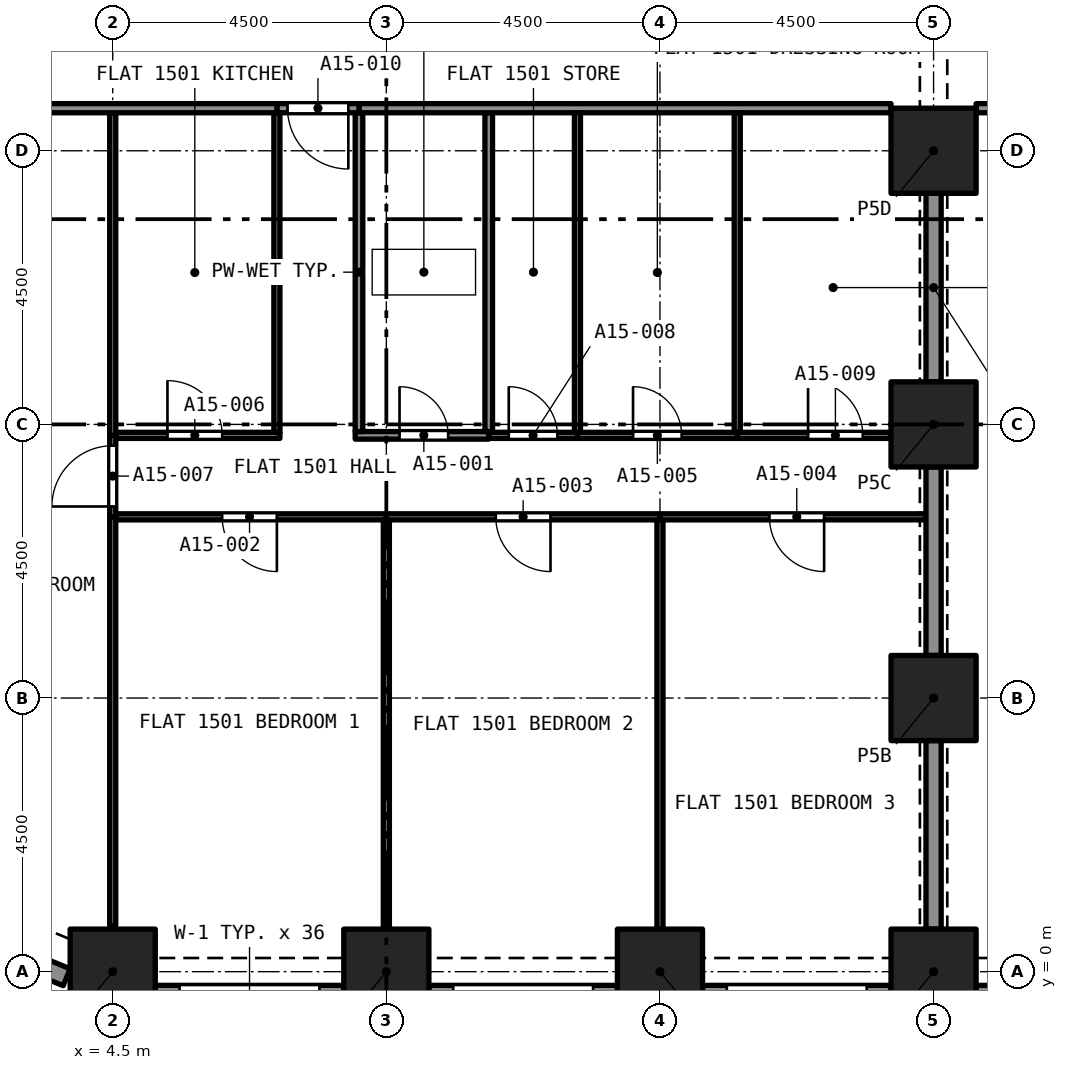
"""IFC4 building model, lengths in metres.
Left out: names, types, materials, properties, quantities, classifications, styles, units other than length and angle.
Written with IfcOpenShell. Run it as: python <this file> out.ifc"""

import sys

from ifc_helpers import new_model, si_unit, direction, frame, frame_2d, origin, origin_2d, place, context, subcontext, project, spatial, rectangle, extrude, element, fill, save


model = new_model("IFC4")
c1 = context("Model", 3, precision=1e-05, world=origin(), true_north=direction((0.0, 1.0)))
c2 = subcontext(c1, "Body", "Model", "MODEL_VIEW")
j1 = project(units=[si_unit("LENGTHUNIT", "METRE"), si_unit("PLANEANGLEUNIT", "RADIAN")], contexts=[c1])
p1 = place(None, origin())
s1 = spatial("IfcSite", under=j1, at=p1, CompositionType="ELEMENT")
p2 = place(p1, origin())
s2 = spatial("IfcBuilding", under=s1, at=p2, CompositionType="ELEMENT")
p3 = place(p2, frame((0.0, 0.0, 59.2)))
s3 = spatial("IfcBuildingStorey", under=s2, at=p3, CompositionType="ELEMENT", Elevation=59.2)
for number, where, z_axis, x_axis in (
    (1, (4.5, 0.0, 0.0), (0.0, 0.0, 1.0), (1.0, 0.0, 0.0)),
    (2, (9.0, 0.0, 0.0), (0.0, 0.0, 1.0), (1.0, 0.0, 0.0)),
    (3, (13.5, 0.0, 0.0), (0.0, 0.0, 1.0), (1.0, 0.0, 0.0)),
    (4, (18.0, 0.0, 0.0), (0.0, 0.0, 1.0), (1.0, 0.0, 0.0)),
    (5, (18.0, 4.5, 0.0), (0.0, 0.0, 1.0), (1.0, 0.0, 0.0)),
    (6, (18.0, 9.0, 0.0), (0.0, 0.0, 1.0), (1.0, 0.0, 0.0)),
    (7, (18.0, 13.5, 0.0), (0.0, 0.0, 1.0), (1.0, 0.0, 0.0)),
):
    element("IfcColumn", number, at=place(p3, frame(where, z_axis=z_axis, x_axis=x_axis)), inside=s3, PredefinedType="COLUMN", context=c2, shape_type="SweptSolid", body=[
        extrude(rectangle(XDim=1.4, YDim=1.4, at=origin_2d()), origin(), (0.0, 0.0, 1.0), 3.2),
    ])
p4 = place(p3, frame((3.743, -0.092, 0.0), z_axis=(0.0, 0.0, 1.0), x_axis=(-0.923857286003, 0.382737135771, 0.0)))
e8 = element("IfcWall", 8, at=p4, inside=s3, PredefinedType="SOLIDWALL", context=c2, shape_type="SweptSolid", body=[
    extrude(rectangle(XDim=1.865, YDim=0.3, at=frame_2d((0.933, 0.0))), origin(), (0.0, 0.0, 1.0), 3.2),
])
p5 = place(p4, frame((0.508, 0.0, 0.45)))
e9 = element("IfcOpeningElement", 9, at=p5, cuts=e8, PredefinedType="OPENING", context=c2, shape_type="SweptSolid", body=[
    extrude(rectangle(XDim=1.1, YDim=1.95, at=frame_2d((0.55, 0.975))), frame((0.0, 0.16, 0.0), z_axis=(0.0, -1.0, 0.0), x_axis=(1.0, 0.0, 0.0)), (0.0, 0.0, 1.0), 0.32),
])
p6 = place(p3, frame((8.3, -0.375, 0.0), z_axis=(0.0, 0.0, 1.0), x_axis=(-1.0, 0.0, 0.0)))
e10 = element("IfcWall", 10, at=p6, inside=s3, PredefinedType="SOLIDWALL", context=c2, shape_type="SweptSolid", body=[
    extrude(rectangle(XDim=3.1, YDim=0.3, at=frame_2d((1.55, 0.0))), origin(), (0.0, 0.0, 1.0), 3.2),
])
p7 = place(p6, frame((0.4, 0.0, 0.45)))
e11 = element("IfcOpeningElement", 11, at=p7, cuts=e10, PredefinedType="OPENING", context=c2, shape_type="SweptSolid", body=[
    extrude(rectangle(XDim=2.3, YDim=1.95, at=frame_2d((1.15, 0.975))), frame((0.0, 0.16, 0.0), z_axis=(0.0, -1.0, 0.0), x_axis=(1.0, 0.0, 0.0)), (0.0, 0.0, 1.0), 0.32),
])
p8 = place(p3, frame((12.8, -0.375, 0.0), z_axis=(0.0, 0.0, 1.0), x_axis=(-1.0, 0.0, 0.0)))
e12 = element("IfcWall", 12, at=p8, inside=s3, PredefinedType="SOLIDWALL", context=c2, shape_type="SweptSolid", body=[
    extrude(rectangle(XDim=3.1, YDim=0.3, at=frame_2d((1.55, 0.0))), origin(), (0.0, 0.0, 1.0), 3.2),
])
p9 = place(p8, frame((0.4, 0.0, 0.45)))
e13 = element("IfcOpeningElement", 13, at=p9, cuts=e12, PredefinedType="OPENING", context=c2, shape_type="SweptSolid", body=[
    extrude(rectangle(XDim=2.3, YDim=1.95, at=frame_2d((1.15, 0.975))), frame((0.0, 0.16, 0.0), z_axis=(0.0, -1.0, 0.0), x_axis=(1.0, 0.0, 0.0)), (0.0, 0.0, 1.0), 0.32),
])
p10 = place(p3, frame((17.3, -0.375, 0.0), z_axis=(0.0, 0.0, 1.0), x_axis=(-1.0, 0.0, 0.0)))
e14 = element("IfcWall", 14, at=p10, inside=s3, PredefinedType="SOLIDWALL", context=c2, shape_type="SweptSolid", body=[
    extrude(rectangle(XDim=3.1, YDim=0.3, at=frame_2d((1.55, 0.0))), origin(), (0.0, 0.0, 1.0), 3.2),
])
p11 = place(p10, frame((0.4, 0.0, 0.45)))
e15 = element("IfcOpeningElement", 15, at=p11, cuts=e14, PredefinedType="OPENING", context=c2, shape_type="SweptSolid", body=[
    extrude(rectangle(XDim=2.3, YDim=1.95, at=frame_2d((1.15, 0.975))), frame((0.0, 0.16, 0.0), z_axis=(0.0, -1.0, 0.0), x_axis=(1.0, 0.0, 0.0)), (0.0, 0.0, 1.0), 0.32),
])
p12 = place(p3, frame((21.8, -0.375, 0.0), z_axis=(0.0, 0.0, 1.0), x_axis=(-1.0, 0.0, 0.0)))
e16 = element("IfcWall", 16, at=p12, inside=s3, PredefinedType="SOLIDWALL", context=c2, shape_type="SweptSolid", body=[
    extrude(rectangle(XDim=3.1, YDim=0.3, at=frame_2d((1.55, 0.0))), origin(), (0.0, 0.0, 1.0), 3.2),
])
p13 = place(p12, frame((0.4, 0.0, 0.45)))
e17 = element("IfcOpeningElement", 17, at=p13, cuts=e16, PredefinedType="OPENING", context=c2, shape_type="SweptSolid", body=[
    extrude(rectangle(XDim=2.3, YDim=1.95, at=frame_2d((1.15, 0.975))), frame((0.0, 0.16, 0.0), z_axis=(0.0, -1.0, 0.0), x_axis=(1.0, 0.0, 0.0)), (0.0, 0.0, 1.0), 0.32),
])
p14 = place(p3, frame((8.488, 8.82, 0.0), z_axis=(0.0, 0.0, 1.0), x_axis=(1.0, 0.0, 0.0)))
e18 = element("IfcWall", 18, at=p14, inside=s3, PredefinedType="PARTITIONING", context=c2, shape_type="SweptSolid", body=[
    extrude(rectangle(XDim=2.196, YDim=0.125, at=frame_2d((1.098, 0.0))), origin(), (0.0, 0.0, 1.0), 2.9),
])
p15 = place(p14, frame((0.729, 0.0, 0.0)))
e19 = element("IfcOpeningElement", 19, at=p15, cuts=e18, PredefinedType="OPENING", context=c2, shape_type="SweptSolid", body=[
    extrude(rectangle(XDim=0.8, YDim=2.1, at=frame_2d((0.4, 1.05))), frame((0.0, 0.073, 0.0), z_axis=(0.0, -1.0, 0.0), x_axis=(1.0, 0.0, 0.0)), (0.0, 0.0, 1.0), 0.145),
])
for number, where, z_axis, x_axis in (
    (20, (8.55, 8.883, 0.0), (0.0, 0.0, 1.0), (0.0, 1.0, 0.0)),
    (21, (10.684, 8.883, 0.0), (0.0, 0.0, 1.0), (0.0, 1.0, 0.0)),
):
    element("IfcWall", number, at=place(p3, frame(where, z_axis=z_axis, x_axis=x_axis)), inside=s3, PredefinedType="PARTITIONING", context=c2, shape_type="SweptSolid", body=[
        extrude(rectangle(XDim=5.242, YDim=0.125, at=frame_2d((2.621, 0.0))), origin(), (0.0, 0.0, 1.0), 2.9),
    ])
p16 = place(p3, frame((8.55, 14.2, 0.0), z_axis=(0.0, 0.0, 1.0), x_axis=(1.0, 0.0, 0.0)))
e22 = element("IfcWall", 22, at=p16, inside=s3, PredefinedType="PARTITIONING", context=c2, shape_type="SweptSolid", body=[
    extrude(rectangle(XDim=8.75, YDim=0.15, at=frame_2d((4.375, 0.0))), origin(), (0.0, 0.0, 1.0), 2.9),
])
p17 = place(p3, frame((9.0, 0.7, 0.0), z_axis=(0.0, 0.0, 1.0), x_axis=(0.0, 1.0, 0.0)))
e23 = element("IfcWall", 23, at=p17, inside=s3, PredefinedType="PARTITIONING", context=c2, shape_type="SweptSolid", body=[
    extrude(rectangle(XDim=6.73, YDim=0.1, at=frame_2d((3.365, 0.0))), origin(), (0.0, 0.0, 1.0), 2.9),
])
p18 = place(p3, frame((9.0, 7.48, 0.0), z_axis=(0.0, 0.0, 1.0), x_axis=(-1.0, 0.0, 0.0)))
e24 = element("IfcWall", 24, at=p18, inside=s3, PredefinedType="PARTITIONING", context=c2, shape_type="SweptSolid", body=[
    extrude(rectangle(XDim=4.45, YDim=0.1, at=frame_2d((2.225, 0.0))), origin(), (0.0, 0.0, 1.0), 2.9),
])
p19 = place(p18, frame((1.8, 0.0, 0.0)))
e25 = element("IfcOpeningElement", 25, at=p19, cuts=e24, PredefinedType="OPENING", context=c2, shape_type="SweptSolid", body=[
    extrude(rectangle(XDim=0.9, YDim=2.1, at=frame_2d((0.45, 1.05))), frame((0.0, 0.06, 0.0), z_axis=(0.0, -1.0, 0.0), x_axis=(1.0, 0.0, 0.0)), (0.0, 0.0, 1.0), 0.12),
])
p20 = place(p3, frame((4.5, 0.758, 0.0), z_axis=(0.0, 0.0, 1.0), x_axis=(0.0, 1.0, 0.0)))
e26 = element("IfcWall", 26, at=p20, inside=s3, PredefinedType="PARTITIONING", context=c2, shape_type="SweptSolid", body=[
    extrude(rectangle(XDim=6.722, YDim=0.1, at=frame_2d((3.361, 0.0))), origin(), (0.0, 0.0, 1.0), 2.9),
])
p21 = place(p3, frame((13.5, 0.7, 0.0), z_axis=(0.0, 0.0, 1.0), x_axis=(0.0, 1.0, 0.0)))
e27 = element("IfcWall", 27, at=p21, inside=s3, PredefinedType="PARTITIONING", context=c2, shape_type="SweptSolid", body=[
    extrude(rectangle(XDim=6.73, YDim=0.1, at=frame_2d((3.365, 0.0))), origin(), (0.0, 0.0, 1.0), 2.9),
])
p22 = place(p3, frame((13.5, 7.48, 0.0), z_axis=(0.0, 0.0, 1.0), x_axis=(-1.0, 0.0, 0.0)))
e28 = element("IfcWall", 28, at=p22, inside=s3, PredefinedType="PARTITIONING", context=c2, shape_type="SweptSolid", body=[
    extrude(rectangle(XDim=4.5, YDim=0.1, at=frame_2d((2.25, 0.0))), origin(), (0.0, 0.0, 1.0), 2.9),
])
p23 = place(p22, frame((1.8, 0.0, 0.0)))
e29 = element("IfcOpeningElement", 29, at=p23, cuts=e28, PredefinedType="OPENING", context=c2, shape_type="SweptSolid", body=[
    extrude(rectangle(XDim=0.9, YDim=2.1, at=frame_2d((0.45, 1.05))), frame((0.0, 0.06, 0.0), z_axis=(0.0, -1.0, 0.0), x_axis=(1.0, 0.0, 0.0)), (0.0, 0.0, 1.0), 0.12),
])
p24 = place(p3, frame((17.875, 7.48, 0.0), z_axis=(0.0, 0.0, 1.0), x_axis=(-1.0, 0.0, 0.0)))
e30 = element("IfcWall", 30, at=p24, inside=s3, PredefinedType="PARTITIONING", context=c2, shape_type="SweptSolid", body=[
    extrude(rectangle(XDim=4.375, YDim=0.1, at=frame_2d((2.188, 0.0))), origin(), (0.0, 0.0, 1.0), 2.9),
])
p25 = place(p24, frame((1.675, 0.0, 0.0)))
e31 = element("IfcOpeningElement", 31, at=p25, cuts=e30, PredefinedType="OPENING", context=c2, shape_type="SweptSolid", body=[
    extrude(rectangle(XDim=0.9, YDim=2.1, at=frame_2d((0.45, 1.05))), frame((0.0, 0.06, 0.0), z_axis=(0.0, -1.0, 0.0), x_axis=(1.0, 0.0, 0.0)), (0.0, 0.0, 1.0), 0.12),
])
for number, where, z_axis, x_axis in (
    (32, (18.0, 5.2, 0.0), (0.0, 0.0, 1.0), (0.0, 1.0, 0.0)),
    (33, (18.0, 0.7, 0.0), (0.0, 0.0, 1.0), (0.0, 1.0, 0.0)),
):
    element("IfcWall", number, at=place(p3, frame(where, z_axis=z_axis, x_axis=x_axis)), inside=s3, PredefinedType="PARTITIONING", context=c2, shape_type="SweptSolid", body=[
        extrude(rectangle(XDim=3.1, YDim=0.25, at=frame_2d((1.55, 0.0))), origin(), (0.0, 0.0, 1.0), 2.38),
    ])
p26 = place(p3, frame((12.143, 8.82, 0.0), z_axis=(0.0, 0.0, 1.0), x_axis=(1.0, 0.0, 0.0)))
e34 = element("IfcWall", 34, at=p26, inside=s3, PredefinedType="PARTITIONING", context=c2, shape_type="SweptSolid", body=[
    extrude(rectangle(XDim=2.628, YDim=0.1, at=frame_2d((1.314, 0.0))), origin(), (0.0, 0.0, 1.0), 2.9),
])
p27 = place(p26, frame((0.914, 0.0, 0.0)))
e35 = element("IfcOpeningElement", 35, at=p27, cuts=e34, PredefinedType="OPENING", context=c2, shape_type="SweptSolid", body=[
    extrude(rectangle(XDim=0.8, YDim=2.1, at=frame_2d((0.4, 1.05))), frame((0.0, 0.06, 0.0), z_axis=(0.0, -1.0, 0.0), x_axis=(1.0, 0.0, 0.0)), (0.0, 0.0, 1.0), 0.12),
])
for number, where, z_axis, x_axis in (
    (36, (12.143, 8.87, 0.0), (0.0, 0.0, 1.0), (0.0, 1.0, 0.0)),
    (37, (14.771, 8.87, 0.0), (0.0, 0.0, 1.0), (0.0, 1.0, 0.0)),
):
    element("IfcWall", number, at=place(p3, frame(where, z_axis=z_axis, x_axis=x_axis)), inside=s3, PredefinedType="PARTITIONING", context=c2, shape_type="SweptSolid", body=[
        extrude(rectangle(XDim=5.255, YDim=0.1, at=frame_2d((2.627, 0.0))), origin(), (0.0, 0.0, 1.0), 2.9),
    ])
p28 = place(p3, frame((4.55, 8.82, 0.0), z_axis=(0.0, 0.0, 1.0), x_axis=(1.0, 0.0, 0.0)))
e38 = element("IfcWall", 38, at=p28, inside=s3, PredefinedType="PARTITIONING", context=c2, shape_type="SweptSolid", body=[
    extrude(rectangle(XDim=2.7, YDim=0.1, at=frame_2d((1.35, 0.0))), origin(), (0.0, 0.0, 1.0), 2.9),
])
p29 = place(p28, frame((0.85, 0.0, 0.0)))
e39 = element("IfcOpeningElement", 39, at=p29, cuts=e38, PredefinedType="OPENING", context=c2, shape_type="SweptSolid", body=[
    extrude(rectangle(XDim=0.9, YDim=2.1, at=frame_2d((0.45, 1.05))), frame((0.0, 0.06, 0.0), z_axis=(0.0, -1.0, 0.0), x_axis=(1.0, 0.0, 0.0)), (0.0, 0.0, 1.0), 0.12),
])
p30 = place(p3, frame((7.2, 8.87, 0.0), z_axis=(0.0, 0.0, 1.0), x_axis=(0.0, 1.0, 0.0)))
e40 = element("IfcWall", 40, at=p30, inside=s3, PredefinedType="PARTITIONING", context=c2, shape_type="SweptSolid", body=[
    extrude(rectangle(XDim=5.255, YDim=0.1, at=frame_2d((2.627, 0.0))), origin(), (0.0, 0.0, 1.0), 2.9),
])
p31 = place(p3, frame((4.5, 7.48, 0.0), z_axis=(0.0, 0.0, 1.0), x_axis=(0.0, 1.0, 0.0)))
e41 = element("IfcWall", 41, at=p31, inside=s3, PredefinedType="PARTITIONING", context=c2, shape_type="SweptSolid", body=[
    extrude(rectangle(XDim=1.34, YDim=0.1, at=frame_2d((0.67, 0.0))), origin(), (0.0, 0.0, 1.0), 2.9),
])
p32 = place(p31, frame((0.17, 0.0, 0.0)))
e42 = element("IfcOpeningElement", 42, at=p32, cuts=e41, PredefinedType="OPENING", context=c2, shape_type="SweptSolid", body=[
    extrude(rectangle(XDim=1.0, YDim=2.1, at=frame_2d((0.5, 1.05))), frame((0.0, 0.06, 0.0), z_axis=(0.0, -1.0, 0.0), x_axis=(1.0, 0.0, 0.0)), (0.0, 0.0, 1.0), 0.12),
])
p33 = place(p3, frame((10.684, 8.82, 0.0), z_axis=(0.0, 0.0, 1.0), x_axis=(1.0, 0.0, 0.0)))
e43 = element("IfcWall", 43, at=p33, inside=s3, PredefinedType="PARTITIONING", context=c2, shape_type="SweptSolid", body=[
    extrude(rectangle(XDim=1.46, YDim=0.1, at=frame_2d((0.73, 0.0))), origin(), (0.0, 0.0, 1.0), 2.9),
])
p34 = place(p33, frame((0.33, 0.0, 0.0)))
e44 = element("IfcOpeningElement", 44, at=p34, cuts=e43, PredefinedType="OPENING", context=c2, shape_type="SweptSolid", body=[
    extrude(rectangle(XDim=0.8, YDim=2.1, at=frame_2d((0.4, 1.05))), frame((0.0, 0.06, 0.0), z_axis=(0.0, -1.0, 0.0), x_axis=(1.0, 0.0, 0.0)), (0.0, 0.0, 1.0), 0.12),
])
p35 = place(p3, frame((14.771, 8.82, 0.0), z_axis=(0.0, 0.0, 1.0), x_axis=(1.0, 0.0, 0.0)))
e45 = element("IfcWall", 45, at=p35, inside=s3, PredefinedType="PARTITIONING", context=c2, shape_type="SweptSolid", body=[
    extrude(rectangle(XDim=2.529, YDim=0.1, at=frame_2d((1.265, 0.0))), origin(), (0.0, 0.0, 1.0), 2.9),
])
p36 = place(p35, frame((1.165, 0.0, 0.0)))
e46 = element("IfcOpeningElement", 46, at=p36, cuts=e45, PredefinedType="OPENING", context=c2, shape_type="SweptSolid", body=[
    extrude(rectangle(XDim=0.9, YDim=2.1, at=frame_2d((0.45, 1.05))), frame((0.0, 0.06, 0.0), z_axis=(0.0, -1.0, 0.0), x_axis=(1.0, 0.0, 0.0)), (0.0, 0.0, 1.0), 0.12),
])
p37 = place(p3, frame((8.55, 14.2, 0.0), z_axis=(0.0, 0.0, 1.0), x_axis=(-1.0, 0.0, 0.0)))
e47 = element("IfcWall", 47, at=p37, inside=s3, PredefinedType="PARTITIONING", context=c2, shape_type="SweptSolid", body=[
    extrude(rectangle(XDim=1.35, YDim=0.15, at=frame_2d((0.675, 0.0))), origin(), (0.0, 0.0, 1.0), 2.9),
])
p38 = place(p37, frame((0.175, 0.0, 0.0)))
e48 = element("IfcOpeningElement", 48, at=p38, cuts=e47, PredefinedType="OPENING", context=c2, shape_type="SweptSolid", body=[
    extrude(rectangle(XDim=1.0, YDim=2.1, at=frame_2d((0.5, 1.05))), frame((0.0, 0.085, 0.0), z_axis=(0.0, -1.0, 0.0), x_axis=(1.0, 0.0, 0.0)), (0.0, 0.0, 1.0), 0.17),
])
p39 = place(p3, frame((4.5, 8.82, 0.0), z_axis=(0.0, 0.0, 1.0), x_axis=(0.0, 1.0, 0.0)))
e49 = element("IfcWall", 49, at=p39, inside=s3, PredefinedType="PARTITIONING", context=c2, shape_type="SweptSolid", body=[
    extrude(rectangle(XDim=5.305, YDim=0.1, at=frame_2d((2.652, 0.0))), origin(), (0.0, 0.0, 1.0), 2.9),
])
p40 = place(p3, frame((0.7, 14.2, 0.0), z_axis=(0.0, 0.0, 1.0), x_axis=(1.0, 0.0, 0.0)))
e50 = element("IfcWall", 50, at=p40, inside=s3, PredefinedType="PARTITIONING", context=c2, shape_type="SweptSolid", body=[
    extrude(rectangle(XDim=6.5, YDim=0.15, at=frame_2d((3.25, 0.0))), origin(), (0.0, 0.0, 1.0), 2.9),
])
p41 = place(p3, frame((18.0, 9.7, 0.0), z_axis=(0.0, 0.0, 1.0), x_axis=(0.0, 1.0, 0.0)))
e51 = element("IfcWall", 51, at=p41, inside=s3, PredefinedType="PARTITIONING", context=c2, shape_type="SweptSolid", body=[
    extrude(rectangle(XDim=3.1, YDim=0.25, at=frame_2d((1.55, 0.0))), origin(), (0.0, 0.0, 1.0), 2.38),
])
p42 = place(p3, frame((22.5, 14.2, 0.0), z_axis=(0.0, 0.0, 1.0), x_axis=(-1.0, 0.0, 0.0)))
e52 = element("IfcWall", 52, at=p42, inside=s3, PredefinedType="PARTITIONING", context=c2, shape_type="SweptSolid", body=[
    extrude(rectangle(XDim=3.8, YDim=0.15, at=frame_2d((1.9, 0.0))), origin(), (0.0, 0.0, 1.0), 2.75),
])
p43 = place(p42, frame((1.75, 0.0, 0.0)))
e53 = element("IfcOpeningElement", 53, at=p43, cuts=e52, PredefinedType="OPENING", context=c2, shape_type="SweptSolid", body=[
    extrude(rectangle(XDim=1.0, YDim=2.1, at=frame_2d((0.5, 1.05))), frame((0.0, 0.085, 0.0), z_axis=(0.0, -1.0, 0.0), x_axis=(1.0, 0.0, 0.0)), (0.0, 0.0, 1.0), 0.17),
])
p44 = place(p15, origin())
e54 = element("IfcDoor", 54, at=p44, inside=s3, OperationType="SINGLE_SWING_RIGHT", PredefinedType="DOOR", context=c2, shape_type="SweptSolid", body=[
    extrude(rectangle(XDim=0.8, YDim=2.1, at=frame_2d((0.4, 1.05))), frame((0.0, 0.025, 0.0), z_axis=(0.0, -1.0, 0.0), x_axis=(1.0, 0.0, 0.0)), (0.0, 0.0, 1.0), 0.05),
])
fill(e19, e54)
p45 = place(p19, origin())
e55 = element("IfcDoor", 55, at=p45, inside=s3, OperationType="SINGLE_SWING_RIGHT", PredefinedType="DOOR", context=c2, shape_type="SweptSolid", body=[
    extrude(rectangle(XDim=0.9, YDim=2.1, at=frame_2d((0.45, 1.05))), frame((0.0, 0.025, 0.0), z_axis=(0.0, -1.0, 0.0), x_axis=(1.0, 0.0, 0.0)), (0.0, 0.0, 1.0), 0.05),
])
fill(e25, e55)
p46 = place(p23, origin())
e56 = element("IfcDoor", 56, at=p46, inside=s3, OperationType="SINGLE_SWING_LEFT", PredefinedType="DOOR", context=c2, shape_type="SweptSolid", body=[
    extrude(rectangle(XDim=0.9, YDim=2.1, at=frame_2d((0.45, 1.05))), frame((0.0, 0.025, 0.0), z_axis=(0.0, -1.0, 0.0), x_axis=(1.0, 0.0, 0.0)), (0.0, 0.0, 1.0), 0.05),
])
fill(e29, e56)
p47 = place(p25, origin())
e57 = element("IfcDoor", 57, at=p47, inside=s3, OperationType="SINGLE_SWING_LEFT", PredefinedType="DOOR", context=c2, shape_type="SweptSolid", body=[
    extrude(rectangle(XDim=0.9, YDim=2.1, at=frame_2d((0.45, 1.05))), frame((0.0, 0.025, 0.0), z_axis=(0.0, -1.0, 0.0), x_axis=(1.0, 0.0, 0.0)), (0.0, 0.0, 1.0), 0.05),
])
fill(e31, e57)
p48 = place(p27, origin())
e58 = element("IfcDoor", 58, at=p48, inside=s3, OperationType="SINGLE_SWING_LEFT", PredefinedType="DOOR", context=c2, shape_type="SweptSolid", body=[
    extrude(rectangle(XDim=0.8, YDim=2.1, at=frame_2d((0.4, 1.05))), frame((0.0, 0.025, 0.0), z_axis=(0.0, -1.0, 0.0), x_axis=(1.0, 0.0, 0.0)), (0.0, 0.0, 1.0), 0.05),
])
fill(e35, e58)
p49 = place(p29, origin())
e59 = element("IfcDoor", 59, at=p49, inside=s3, OperationType="SINGLE_SWING_LEFT", PredefinedType="DOOR", context=c2, shape_type="SweptSolid", body=[
    extrude(rectangle(XDim=0.9, YDim=2.1, at=frame_2d((0.45, 1.05))), frame((0.0, 0.025, 0.0), z_axis=(0.0, -1.0, 0.0), x_axis=(1.0, 0.0, 0.0)), (0.0, 0.0, 1.0), 0.05),
])
fill(e39, e59)
p50 = place(p32, origin())
e60 = element("IfcDoor", 60, at=p50, inside=s3, OperationType="SINGLE_SWING_RIGHT", PredefinedType="DOOR", context=c2, shape_type="SweptSolid", body=[
    extrude(rectangle(XDim=1.0, YDim=2.1, at=frame_2d((0.5, 1.05))), frame((0.0, 0.025, 0.0), z_axis=(0.0, -1.0, 0.0), x_axis=(1.0, 0.0, 0.0)), (0.0, 0.0, 1.0), 0.05),
])
fill(e42, e60)
p51 = place(p34, origin())
e61 = element("IfcDoor", 61, at=p51, inside=s3, OperationType="SINGLE_SWING_LEFT", PredefinedType="DOOR", context=c2, shape_type="SweptSolid", body=[
    extrude(rectangle(XDim=0.8, YDim=2.1, at=frame_2d((0.4, 1.05))), frame((0.0, 0.025, 0.0), z_axis=(0.0, -1.0, 0.0), x_axis=(1.0, 0.0, 0.0)), (0.0, 0.0, 1.0), 0.05),
])
fill(e44, e61)
p52 = place(p36, origin())
e62 = element("IfcDoor", 62, at=p52, inside=s3, OperationType="SINGLE_SWING_RIGHT", PredefinedType="DOOR", context=c2, shape_type="SweptSolid", body=[
    extrude(rectangle(XDim=0.9, YDim=2.1, at=frame_2d((0.45, 1.05))), frame((0.0, 0.025, 0.0), z_axis=(0.0, -1.0, 0.0), x_axis=(1.0, 0.0, 0.0)), (0.0, 0.0, 1.0), 0.05),
])
fill(e46, e62)
p53 = place(p38, origin())
e63 = element("IfcDoor", 63, at=p53, inside=s3, OperationType="SINGLE_SWING_RIGHT", PredefinedType="DOOR", context=c2, shape_type="SweptSolid", body=[
    extrude(rectangle(XDim=1.0, YDim=2.1, at=frame_2d((0.5, 1.05))), frame((0.0, 0.025, 0.0), z_axis=(0.0, -1.0, 0.0), x_axis=(1.0, 0.0, 0.0)), (0.0, 0.0, 1.0), 0.05),
])
fill(e48, e63)
save(model, sys.argv[1])
